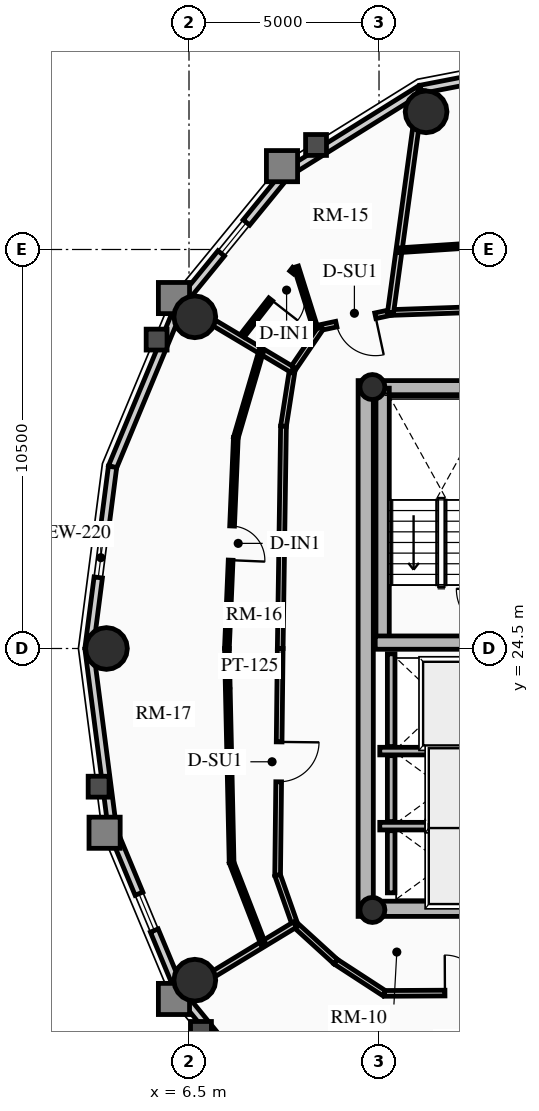
"""IFC4 building model, lengths in metres.
Left out: names, types, materials, properties, quantities, classifications, styles, units other than length and angle.
Written with IfcOpenShell. Run it as: python <this file> out.ifc"""

import sys

from ifc_helpers import new_model, si_unit, direction, frame, frame_2d, origin, origin_2d, place, context, subcontext, project, spatial, rectangle, circle, hollow_circle, extrude, source, transform, mapped, element, fill, save


model = new_model("IFC4")
c1 = context("Model", 3, precision=1e-05, world=origin(), true_north=direction((0.0, 1.0)))
c2 = subcontext(c1, "Body", "Model", "MODEL_VIEW")
j1 = project(units=[si_unit("LENGTHUNIT", "METRE"), si_unit("PLANEANGLEUNIT", "RADIAN")], contexts=[c1])
p1 = place(None, origin())
s1 = spatial("IfcSite", under=j1, at=p1, CompositionType="ELEMENT")
p2 = place(p1, origin())
s2 = spatial("IfcBuilding", under=s1, at=p2, CompositionType="ELEMENT")
p3 = place(p2, frame((0.0, 0.0, 219.94)))
s3 = spatial("IfcBuildingStorey", under=s2, at=p3, CompositionType="ELEMENT", Elevation=219.94)
p4 = place(p3, frame((11.15, 17.45, 0.0), z_axis=(0.0, 0.0, 1.0), x_axis=(0.0, 1.0, 0.0)))
e1 = element("IfcWall", 1, at=p4, inside=s3, PredefinedType="SHEAR", context=c2, shape_type="SweptSolid", body=[
    extrude(rectangle(XDim=14.1, YDim=0.4, at=frame_2d((7.05, 0.0))), origin(), (0.0, 0.0, 1.0), 2.91),
])
p5 = place(p3, frame((11.15, 17.65, 0.0), z_axis=(0.0, 0.0, 1.0), x_axis=(1.0, 0.0, 0.0)))
e2 = element("IfcWall", 2, at=p5, inside=s3, PredefinedType="SHEAR", context=c2, shape_type="SweptSolid", body=[
    extrude(rectangle(XDim=10.7, YDim=0.4, at=frame_2d((5.35, 0.0))), origin(), (0.0, 0.0, 1.0), 2.91),
])
m1 = source(origin(), c2, "Body", "SweptSolid", [
    extrude(rectangle(XDim=1.5, YDim=2.02, at=frame_2d((0.75, 1.01))), frame((0.0, 0.21, 0.0), z_axis=(0.0, -1.0, 0.0), x_axis=(1.0, 0.0, 0.0)), (0.0, 0.0, 1.0), 0.42),
])
p6 = place(p5, frame((5.45, 0.0, 0.0)))
e3 = element("IfcOpeningElement", 3, at=p6, cuts=e2, PredefinedType="OPENING", context=c2, shape_type="MappedRepresentation", body=[
    mapped(m1, transform((0.0, 0.0, 0.0), x_axis=(1.0, 0.0, 0.0), y_axis=(0.0, 1.0, 0.0), z_axis=(0.0, 0.0, 1.0), scale=1.0)),
])
p7 = place(p3, frame((11.15, 31.35, 0.0), z_axis=(0.0, 0.0, 1.0), x_axis=(1.0, 0.0, 0.0)))
e4 = element("IfcWall", 4, at=p7, inside=s3, PredefinedType="SHEAR", context=c2, shape_type="SweptSolid", body=[
    extrude(rectangle(XDim=10.7, YDim=0.4, at=frame_2d((5.35, 0.0))), origin(), (0.0, 0.0, 1.0), 2.91),
])
p8 = place(p7, frame((4.6, 0.0, 0.0)))
e5 = element("IfcOpeningElement", 5, at=p8, cuts=e4, PredefinedType="OPENING", context=c2, shape_type="MappedRepresentation", body=[
    mapped(m1, transform((0.0, 0.0, 0.0), x_axis=(1.0, 0.0, 0.0), y_axis=(0.0, 1.0, 0.0), z_axis=(0.0, 0.0, 1.0), scale=1.0)),
])
p9 = place(p3, frame((11.595, 24.655, 0.0), z_axis=(0.0, 0.0, 1.0), x_axis=(0.0, 1.0, 0.0)))
e6 = element("IfcWall", 6, at=p9, inside=s3, PredefinedType="SHEAR", context=c2, shape_type="SweptSolid", body=[
    extrude(rectangle(XDim=6.695, YDim=0.35, at=frame_2d((3.348, 0.0))), origin(), (0.0, 0.0, 1.0), 2.91),
])
p10 = place(p3, frame((11.4, 24.655, 0.0), z_axis=(0.0, 0.0, 1.0), x_axis=(1.0, 0.0, 0.0)))
e7 = element("IfcWall", 7, at=p10, inside=s3, PredefinedType="SHEAR", context=c2, shape_type="SweptSolid", body=[
    extrude(rectangle(XDim=3.285, YDim=0.35, at=frame_2d((1.643, 0.0))), origin(), (0.0, 0.0, 1.0), 2.91),
])
for number, where, z_axis, x_axis in (
    (8, (11.325, 17.62, 0.0), (0.0, 0.0, 1.0), (1.0, 0.0, 0.0)),
    (9, (11.325, 31.38, 0.0), (0.0, 0.0, 1.0), (1.0, 0.0, 0.0)),
):
    element("IfcColumn", number, at=place(p3, frame(where, z_axis=z_axis, x_axis=x_axis)), inside=s3, PredefinedType="COLUMN", context=c2, shape_type="SweptSolid", body=[
        extrude(hollow_circle(Radius=0.33, WallThickness=0.025, at=origin_2d()), origin(), (0.0, 0.0, 1.0), 2.91),
    ])
for number, where, z_axis, x_axis in (
    (10, (12.739, 38.623, 0.0), (0.0, 0.0, 1.0), (1.0, 0.0, 0.0)),
    (11, (6.653, 33.229, 0.0), (0.0, 0.0, 1.0), (1.0, 0.0, 0.0)),
    (12, (4.328, 24.5, 0.0), (0.0, 0.0, 1.0), (1.0, 0.0, 0.0)),
    (13, (6.653, 15.771, 0.0), (0.0, 0.0, 1.0), (1.0, 0.0, 0.0)),
):
    element("IfcColumn", number, at=place(p3, frame(where, z_axis=z_axis, x_axis=x_axis)), inside=s3, PredefinedType="USERDEFINED", context=c2, shape_type="SweptSolid", body=[
        extrude(circle(Radius=0.55, at=origin_2d()), origin(), (0.0, 0.0, 1.0), 2.91),
    ])
p11 = place(p3, frame((12.597, 39.213, 0.0), z_axis=(0.0, 0.0, 1.0), x_axis=(0.981700307484, 0.190432419211, 0.0)))
e14 = element("IfcWall", 14, at=p11, inside=s3, PredefinedType="SOLIDWALL", context=c2, shape_type="SweptSolid", body=[
    extrude(rectangle(XDim=3.976, YDim=0.22, at=frame_2d((1.988, 0.0))), origin(), (0.0, 0.0, 1.0), 2.322),
])
m2 = source(origin(), c2, "Body", "SweptSolid", [
    extrude(rectangle(XDim=1.05, YDim=1.3, at=frame_2d((0.525, 0.65))), frame((0.0, 0.12, 0.0), z_axis=(0.0, -1.0, 0.0), x_axis=(1.0, 0.0, 0.0)), (0.0, 0.0, 1.0), 0.24),
])
p12 = place(p11, frame((1.463, 0.0, 0.65)))
e15 = element("IfcOpeningElement", 15, at=p12, cuts=e14, PredefinedType="OPENING", context=c2, shape_type="MappedRepresentation", body=[
    mapped(m2, transform((0.0, 0.0, 0.0), x_axis=(1.0, 0.0, 0.0), y_axis=(0.0, 1.0, 0.0), z_axis=(0.0, 0.0, 1.0), scale=1.0)),
])
p13 = place(p3, frame((9.076, 37.015, 0.0), z_axis=(0.0, 0.0, 1.0), x_axis=(0.848318713376, 0.529485939886, 0.0)))
e16 = element("IfcWall", 16, at=p13, inside=s3, PredefinedType="SOLIDWALL", context=c2, shape_type="SweptSolid", body=[
    extrude(rectangle(XDim=4.15, YDim=0.22, at=frame_2d((2.075, 0.0))), origin(), (0.0, 0.0, 1.0), 2.322),
])
p14 = place(p3, frame((6.282, 33.593, 0.0), z_axis=(0.0, 0.0, 1.0), x_axis=(0.632467166636, 0.774587169483, 0.0)))
e17 = element("IfcWall", 17, at=p14, inside=s3, PredefinedType="SOLIDWALL", context=c2, shape_type="SweptSolid", body=[
    extrude(rectangle(XDim=4.418, YDim=0.22, at=frame_2d((2.209, 0.0))), origin(), (0.0, 0.0, 1.0), 2.322),
])
p15 = place(p14, frame((1.684, 0.0, 0.65)))
e18 = element("IfcOpeningElement", 18, at=p15, cuts=e17, PredefinedType="OPENING", context=c2, shape_type="MappedRepresentation", body=[
    mapped(m2, transform((0.0, 0.0, 0.0), x_axis=(1.0, 0.0, 0.0), y_axis=(0.0, 1.0, 0.0), z_axis=(0.0, 0.0, 1.0), scale=1.0)),
])
p16 = place(p3, frame((4.488, 29.281, 0.0), z_axis=(0.0, 0.0, 1.0), x_axis=(0.384036305194, 0.923317993052, 0.0)))
e19 = element("IfcWall", 19, at=p16, inside=s3, PredefinedType="SOLIDWALL", context=c2, shape_type="SweptSolid", body=[
    extrude(rectangle(XDim=4.671, YDim=0.22, at=frame_2d((2.335, 0.0))), origin(), (0.0, 0.0, 1.0), 2.322),
])
p17 = place(p3, frame((3.87, 24.5, 0.0), z_axis=(0.0, 0.0, 1.0), x_axis=(0.128241318541, 0.991742993027, 0.0)))
e20 = element("IfcWall", 20, at=p17, inside=s3, PredefinedType="SOLIDWALL", context=c2, shape_type="SweptSolid", body=[
    extrude(rectangle(XDim=4.82, YDim=0.22, at=frame_2d((2.41, 0.0))), origin(), (0.0, 0.0, 1.0), 2.322),
])
p18 = place(p17, frame((1.885, 0.0, 0.65)))
e21 = element("IfcOpeningElement", 21, at=p18, cuts=e20, PredefinedType="OPENING", context=c2, shape_type="MappedRepresentation", body=[
    mapped(m2, transform((0.0, 0.0, 0.0), x_axis=(1.0, 0.0, 0.0), y_axis=(0.0, 1.0, 0.0), z_axis=(0.0, 0.0, 1.0), scale=1.0)),
])
p19 = place(p3, frame((4.488, 19.719, 0.0), z_axis=(0.0, 0.0, 1.0), x_axis=(-0.128241318541, 0.991742993027, 0.0)))
e22 = element("IfcWall", 22, at=p19, inside=s3, PredefinedType="SOLIDWALL", context=c2, shape_type="SweptSolid", body=[
    extrude(rectangle(XDim=4.82, YDim=0.22, at=frame_2d((2.41, 0.0))), origin(), (0.0, 0.0, 1.0), 2.322),
])
p20 = place(p3, frame((6.282, 15.407, 0.0), z_axis=(0.0, 0.0, 1.0), x_axis=(-0.384036305194, 0.923317993052, 0.0)))
e23 = element("IfcWall", 23, at=p20, inside=s3, PredefinedType="SOLIDWALL", context=c2, shape_type="SweptSolid", body=[
    extrude(rectangle(XDim=4.671, YDim=0.22, at=frame_2d((2.335, 0.0))), origin(), (0.0, 0.0, 1.0), 2.322),
])
p21 = place(p20, frame((1.81, 0.0, 0.65)))
e24 = element("IfcOpeningElement", 24, at=p21, cuts=e23, PredefinedType="OPENING", context=c2, shape_type="MappedRepresentation", body=[
    mapped(m2, transform((0.0, 0.0, 0.0), x_axis=(1.0, 0.0, 0.0), y_axis=(0.0, 1.0, 0.0), z_axis=(0.0, 0.0, 1.0), scale=1.0)),
])
p22 = place(p3, frame((9.076, 11.985, 0.0), z_axis=(0.0, 0.0, 1.0), x_axis=(-0.632467166636, 0.774587169483, 0.0)))
e25 = element("IfcWall", 25, at=p22, inside=s3, PredefinedType="SOLIDWALL", context=c2, shape_type="SweptSolid", body=[
    extrude(rectangle(XDim=4.418, YDim=0.22, at=frame_2d((2.209, 0.0))), origin(), (0.0, 0.0, 1.0), 2.322),
])
p23 = place(p3, frame((11.52, 21.8, 0.0), z_axis=(0.0, 0.0, 1.0), x_axis=(1.0, 0.0, 0.0)))
e26 = element("IfcWall", 26, at=p23, inside=s3, PredefinedType="SHEAR", context=c2, shape_type="SweptSolid", body=[
    extrude(rectangle(XDim=2.97, YDim=0.2, at=frame_2d((1.485, 0.0))), origin(), (0.0, 0.0, 1.0), 2.91),
])
p24 = place(p3, frame((11.82, 21.92, 0.0), z_axis=(0.0, 0.0, 1.0), x_axis=(0.0, 1.0, 0.0)))
e27 = element("IfcWall", 27, at=p24, inside=s3, PredefinedType="SHEAR", context=c2, shape_type="SweptSolid", body=[
    extrude(rectangle(XDim=2.44, YDim=0.2, at=frame_2d((1.22, 0.0))), origin(), (0.0, 0.0, 1.0), 2.91),
])
p25 = place(p3, frame((11.52, 19.825, 0.0), z_axis=(0.0, 0.0, 1.0), x_axis=(1.0, 0.0, 0.0)))
e28 = element("IfcWall", 28, at=p25, inside=s3, PredefinedType="SHEAR", context=c2, shape_type="SweptSolid", body=[
    extrude(rectangle(XDim=2.97, YDim=0.2, at=frame_2d((1.485, 0.0))), origin(), (0.0, 0.0, 1.0), 2.91),
])
p26 = place(p3, frame((11.82, 19.945, 0.0), z_axis=(0.0, 0.0, 1.0), x_axis=(0.0, 1.0, 0.0)))
e29 = element("IfcWall", 29, at=p26, inside=s3, PredefinedType="SHEAR", context=c2, shape_type="SweptSolid", body=[
    extrude(rectangle(XDim=1.735, YDim=0.2, at=frame_2d((0.867, 0.0))), origin(), (0.0, 0.0, 1.0), 2.91),
])
p27 = place(p3, frame((11.82, 18.07, 0.0), z_axis=(0.0, 0.0, 1.0), x_axis=(0.0, 1.0, 0.0)))
e30 = element("IfcWall", 30, at=p27, inside=s3, PredefinedType="SHEAR", context=c2, shape_type="SweptSolid", body=[
    extrude(rectangle(XDim=1.635, YDim=0.2, at=frame_2d((0.817, 0.0))), origin(), (0.0, 0.0, 1.0), 2.91),
])
p28 = place(p3, frame((18.082, 33.56, 0.0), z_axis=(0.0, 0.0, 1.0), x_axis=(-0.999399009709, -0.034664382185, 0.0)))
e31 = element("IfcWall", 31, at=p28, inside=s3, PredefinedType="PARTITIONING", context=c2, shape_type="SweptSolid", body=[
    extrude(rectangle(XDim=6.282, YDim=0.15, at=frame_2d((3.141, 0.0))), origin(), (0.0, 0.0, 1.0), 2.255),
])
p29 = place(p3, frame((11.803, 33.342, 0.0), z_axis=(0.0, 0.0, 1.0), x_axis=(-0.977750742783, -0.209770076483, 0.0)))
e32 = element("IfcWall", 32, at=p29, inside=s3, PredefinedType="PARTITIONING", context=c2, shape_type="SweptSolid", body=[
    extrude(rectangle(XDim=1.868, YDim=0.15, at=frame_2d((0.934, 0.0))), origin(), (0.0, 0.0, 1.0), 2.255),
])
m3 = source(origin(), c2, "Body", "SweptSolid", [
    extrude(rectangle(XDim=1.05, YDim=2.015, at=frame_2d((0.525, 1.007))), frame((0.0, 0.085, 0.0), z_axis=(0.0, -1.0, 0.0), x_axis=(1.0, 0.0, 0.0)), (0.0, 0.0, 1.0), 0.17),
])
p30 = place(p29, frame((0.409, 0.0, 0.0)))
e33 = element("IfcOpeningElement", 33, at=p30, cuts=e32, PredefinedType="OPENING", context=c2, shape_type="MappedRepresentation", body=[
    mapped(m3, transform((0.0, 0.0, 0.0), x_axis=(1.0, 0.0, 0.0), y_axis=(0.0, 1.0, 0.0), z_axis=(0.0, 0.0, 1.0), scale=1.0)),
])
p31 = place(p3, frame((9.977, 32.95, 0.0), z_axis=(0.0, 0.0, 1.0), x_axis=(-0.563291804539, -0.826258036535, 0.0)))
e34 = element("IfcWall", 34, at=p31, inside=s3, PredefinedType="PARTITIONING", context=c2, shape_type="SweptSolid", body=[
    extrude(rectangle(XDim=1.346, YDim=0.15, at=frame_2d((0.673, 0.0))), origin(), (0.0, 0.0, 1.0), 2.322),
])
p32 = place(p3, frame((9.219, 31.838, 0.0), z_axis=(0.0, 0.0, 1.0), x_axis=(-0.154065528966, -0.98806063214, 0.0)))
e35 = element("IfcWall", 35, at=p32, inside=s3, PredefinedType="PARTITIONING", context=c2, shape_type="SweptSolid", body=[
    extrude(rectangle(XDim=1.507, YDim=0.15, at=frame_2d((0.753, 0.0))), origin(), (0.0, 0.0, 1.0), 2.255),
])
p33 = place(p3, frame((8.986, 30.349, 0.0), z_axis=(0.0, 0.0, 1.0), x_axis=(-0.014775478218, -0.999890836663, 0.0)))
e36 = element("IfcWall", 36, at=p33, inside=s3, PredefinedType="PARTITIONING", context=c2, shape_type="SweptSolid", body=[
    extrude(rectangle(XDim=5.849, YDim=0.15, at=frame_2d((2.925, 0.0))), origin(), (0.0, 0.0, 1.0), 2.685),
])
p34 = place(p3, frame((8.9, 24.5, 0.0), z_axis=(0.0, 0.0, 1.0), x_axis=(-0.011416369353, -0.999934831132, 0.0)))
e37 = element("IfcWall", 37, at=p34, inside=s3, PredefinedType="PARTITIONING", context=c2, shape_type="SweptSolid", body=[
    extrude(rectangle(XDim=5.967, YDim=0.15, at=frame_2d((2.983, 0.0))), origin(), (0.0, 0.0, 1.0), 2.322),
])
p35 = place(p34, frame((2.458, 0.0, 0.0)))
e38 = element("IfcOpeningElement", 38, at=p35, cuts=e37, PredefinedType="OPENING", context=c2, shape_type="MappedRepresentation", body=[
    mapped(m3, transform((0.0, 0.0, 0.0), x_axis=(1.0, 0.0, 0.0), y_axis=(0.0, 1.0, 0.0), z_axis=(0.0, 0.0, 1.0), scale=1.0)),
])
p36 = place(p3, frame((8.832, 18.534, 0.0), z_axis=(0.0, 0.0, 1.0), x_axis=(0.332031819657, -0.943268186008, 0.0)))
e39 = element("IfcWall", 39, at=p36, inside=s3, PredefinedType="PARTITIONING", context=c2, shape_type="SweptSolid", body=[
    extrude(rectangle(XDim=1.377, YDim=0.15, at=frame_2d((0.688, 0.0))), origin(), (0.0, 0.0, 1.0), 2.255),
])
p37 = place(p3, frame((9.289, 17.235, 0.0), z_axis=(0.0, 0.0, 1.0), x_axis=(0.739015164946, -0.673688790155, 0.0)))
e40 = element("IfcWall", 40, at=p37, inside=s3, PredefinedType="PARTITIONING", context=c2, shape_type="SweptSolid", body=[
    extrude(rectangle(XDim=1.446, YDim=0.15, at=frame_2d((0.723, 0.0))), origin(), (0.0, 0.0, 1.0), 2.322),
])
p38 = place(p3, frame((10.358, 16.26, 0.0), z_axis=(0.0, 0.0, 1.0), x_axis=(0.838265397059, -0.545262435983, 0.0)))
e41 = element("IfcWall", 41, at=p38, inside=s3, PredefinedType="PARTITIONING", context=c2, shape_type="SweptSolid", body=[
    extrude(rectangle(XDim=1.534, YDim=0.15, at=frame_2d((0.767, 0.0))), origin(), (0.0, 0.0, 1.0), 2.255),
])
p39 = place(p3, frame((11.644, 15.424, 0.0), z_axis=(0.0, 0.0, 1.0), x_axis=(0.999986552511, 0.005186019339, 0.0)))
e42 = element("IfcWall", 42, at=p39, inside=s3, PredefinedType="PARTITIONING", context=c2, shape_type="SweptSolid", body=[
    extrude(rectangle(XDim=3.201, YDim=0.15, at=frame_2d((1.601, 0.0))), origin(), (0.0, 0.0, 1.0), 2.322),
])
m4 = source(origin(), c2, "Body", "SweptSolid", [
    extrude(rectangle(XDim=1.0, YDim=2.015, at=frame_2d((0.5, 1.007))), frame((0.0, 0.085, 0.0), z_axis=(0.0, -1.0, 0.0), x_axis=(1.0, 0.0, 0.0)), (0.0, 0.0, 1.0), 0.17),
])
p40 = place(p39, frame((1.591, 0.0, 0.0)))
e43 = element("IfcOpeningElement", 43, at=p40, cuts=e42, PredefinedType="OPENING", context=c2, shape_type="MappedRepresentation", body=[
    mapped(m4, transform((0.0, 0.0, 0.0), x_axis=(1.0, 0.0, 0.0), y_axis=(0.0, 1.0, 0.0), z_axis=(0.0, 0.0, 1.0), scale=1.0)),
])
p41 = place(p3, frame((11.803, 33.342, 0.0), z_axis=(0.0, 0.0, 1.0), x_axis=(0.135452591041, 0.990783828885, 0.0)))
e44 = element("IfcWall", 44, at=p41, inside=s3, PredefinedType="PARTITIONING", context=c2, shape_type="SweptSolid", body=[
    extrude(rectangle(XDim=5.906, YDim=0.16, at=frame_2d((2.953, 0.0))), origin(), (0.0, 0.0, 1.0), 2.322),
])
p42 = place(p3, frame((9.219, 31.838, 0.0), z_axis=(0.0, 0.0, 1.0), x_axis=(-0.858586714977, 0.512668365384, 0.0)))
e45 = element("IfcWall", 45, at=p42, inside=s3, PredefinedType="PARTITIONING", context=c2, shape_type="SweptSolid", body=[
    extrude(rectangle(XDim=3.401, YDim=0.16, at=frame_2d((1.701, 0.0))), origin(), (0.0, 0.0, 1.0), 2.322),
])
p43 = place(p3, frame((9.289, 17.235, 0.0), z_axis=(0.0, 0.0, 1.0), x_axis=(-0.854741081983, -0.519054604806, 0.0)))
e46 = element("IfcWall", 46, at=p43, inside=s3, PredefinedType="PARTITIONING", context=c2, shape_type="SweptSolid", body=[
    extrude(rectangle(XDim=3.499, YDim=0.16, at=frame_2d((1.75, 0.0))), origin(), (0.0, 0.0, 1.0), 2.322),
])
p44 = place(p3, frame((17.639, 35.349, 0.0), z_axis=(0.0, 0.0, 1.0), x_axis=(-0.997849042159, -0.065553711275, 0.0)))
e47 = element("IfcWall", 47, at=p44, inside=s3, PredefinedType="PARTITIONING", context=c2, shape_type="SweptSolid", body=[
    extrude(rectangle(XDim=5.624, YDim=0.125, at=frame_2d((2.812, 0.0))), origin(), (0.0, 0.0, 1.0), 2.255),
])
m5 = source(origin(), c2, "Body", "SweptSolid", [
    extrude(rectangle(XDim=0.9, YDim=2.005, at=frame_2d((0.45, 1.002))), frame((0.0, 0.073, 0.0), z_axis=(0.0, -1.0, 0.0), x_axis=(1.0, 0.0, 0.0)), (0.0, 0.0, 1.0), 0.145),
])
p45 = place(p44, frame((2.362, 0.0, 0.0)))
e48 = element("IfcOpeningElement", 48, at=p45, cuts=e47, PredefinedType="OPENING", context=c2, shape_type="MappedRepresentation", body=[
    mapped(m5, transform((0.0, 0.0, 0.0), x_axis=(1.0, 0.0, 0.0), y_axis=(0.0, 1.0, 0.0), z_axis=(0.0, 0.0, 1.0), scale=1.0)),
])
p46 = place(p3, frame((9.835, 32.906, 0.0), z_axis=(0.0, 0.0, 1.0), x_axis=(-0.300376803481, 0.953820620416, 0.0)))
e49 = element("IfcWall", 49, at=p46, inside=s3, PredefinedType="PARTITIONING", context=c2, shape_type="SweptSolid", body=[
    extrude(rectangle(XDim=1.719, YDim=0.125, at=frame_2d((0.859, 0.0))), origin(), (0.0, 0.0, 1.0), 2.685),
])
p47 = place(p3, frame((9.276, 34.491, 0.0), z_axis=(0.0, 0.0, 1.0), x_axis=(-0.615039973806, -0.788495929362, 0.0)))
e50 = element("IfcWall", 50, at=p47, inside=s3, PredefinedType="PARTITIONING", context=c2, shape_type="SweptSolid", body=[
    extrude(rectangle(XDim=2.228, YDim=0.125, at=frame_2d((1.114, 0.0))), origin(), (0.0, 0.0, 1.0), 2.322),
])
p48 = place(p47, frame((0.12, 0.0, 0.0)))
e51 = element("IfcOpeningElement", 51, at=p48, cuts=e50, PredefinedType="OPENING", context=c2, shape_type="MappedRepresentation", body=[
    mapped(m5, transform((0.0, 0.0, 0.0), x_axis=(1.0, 0.0, 0.0), y_axis=(0.0, 1.0, 0.0), z_axis=(0.0, 0.0, 1.0), scale=1.0)),
])
p49 = place(p3, frame((8.401, 32.326, 0.0), z_axis=(0.0, 0.0, 1.0), x_axis=(-0.281681886596, -0.959507850288, 0.0)))
e52 = element("IfcWall", 52, at=p49, inside=s3, PredefinedType="PARTITIONING", context=c2, shape_type="SweptSolid", body=[
    extrude(rectangle(XDim=2.374, YDim=0.125, at=frame_2d((1.187, 0.0))), origin(), (0.0, 0.0, 1.0), 2.255),
])
p50 = place(p3, frame((7.732, 30.048, 0.0), z_axis=(0.0, 0.0, 1.0), x_axis=(-0.042296211955, -0.999105114817, 0.0)))
e53 = element("IfcWall", 53, at=p50, inside=s3, PredefinedType="PARTITIONING", context=c2, shape_type="SweptSolid", body=[
    extrude(rectangle(XDim=5.553, YDim=0.125, at=frame_2d((2.776, 0.0))), origin(), (0.0, 0.0, 1.0), 2.685),
])
p51 = place(p50, frame((2.326, 0.0, 0.0)))
e54 = element("IfcOpeningElement", 54, at=p51, cuts=e53, PredefinedType="OPENING", context=c2, shape_type="MappedRepresentation", body=[
    mapped(m5, transform((0.0, 0.0, 0.0), x_axis=(1.0, 0.0, 0.0), y_axis=(0.0, 1.0, 0.0), z_axis=(0.0, 0.0, 1.0), scale=1.0)),
])
p52 = place(p3, frame((7.497, 24.5, 0.0), z_axis=(0.0, 0.0, 1.0), x_axis=(0.021927972859, -0.999759553096, 0.0)))
e55 = element("IfcWall", 55, at=p52, inside=s3, PredefinedType="PARTITIONING", context=c2, shape_type="SweptSolid", body=[
    extrude(rectangle(XDim=5.634, YDim=0.125, at=frame_2d((2.817, 0.0))), origin(), (0.0, 0.0, 1.0), 2.322),
])
p53 = place(p3, frame((7.621, 18.868, 0.0), z_axis=(0.0, 0.0, 1.0), x_axis=(0.361712646649, -0.93228963378, 0.0)))
e56 = element("IfcWall", 56, at=p53, inside=s3, PredefinedType="PARTITIONING", context=c2, shape_type="SweptSolid", body=[
    extrude(rectangle(XDim=2.297, YDim=0.125, at=frame_2d((1.148, 0.0))), origin(), (0.0, 0.0, 1.0), 2.255),
])
m6 = source(origin(), c2, "Body", "SweptSolid", [
    extrude(rectangle(XDim=1.05, YDim=1.3, at=frame_2d((0.525, 0.65))), frame((0.0, 0.03, 0.0), z_axis=(0.0, -1.0, 0.0), x_axis=(1.0, 0.0, 0.0)), (0.0, 0.0, 1.0), 0.06),
])
p54 = place(p15, origin())
e57 = element("IfcWindow", 57, at=p54, inside=s3, PartitioningType="SINGLE_PANEL", PredefinedType="WINDOW", context=c2, shape_type="MappedRepresentation", body=[
    mapped(m6, transform((0.0, 0.0, 0.0), x_axis=(1.0, 0.0, 0.0), y_axis=(0.0, 1.0, 0.0), z_axis=(0.0, 0.0, 1.0), scale=1.0)),
])
fill(e18, e57)
p55 = place(p18, origin())
e58 = element("IfcWindow", 58, at=p55, inside=s3, PartitioningType="SINGLE_PANEL", PredefinedType="WINDOW", context=c2, shape_type="MappedRepresentation", body=[
    mapped(m6, transform((0.0, 0.0, 0.0), x_axis=(1.0, 0.0, 0.0), y_axis=(0.0, 1.0, 0.0), z_axis=(0.0, 0.0, 1.0), scale=1.0)),
])
fill(e21, e58)
p56 = place(p21, origin())
e59 = element("IfcWindow", 59, at=p56, inside=s3, PartitioningType="SINGLE_PANEL", PredefinedType="WINDOW", context=c2, shape_type="MappedRepresentation", body=[
    mapped(m6, transform((0.0, 0.0, 0.0), x_axis=(1.0, 0.0, 0.0), y_axis=(0.0, 1.0, 0.0), z_axis=(0.0, 0.0, 1.0), scale=1.0)),
])
fill(e24, e59)
m7 = source(origin(), c2, "Body", "SweptSolid", [
    extrude(rectangle(XDim=1.05, YDim=2.015, at=frame_2d((0.525, 1.007))), frame((0.0, 0.025, 0.0), z_axis=(0.0, -1.0, 0.0), x_axis=(1.0, 0.0, 0.0)), (0.0, 0.0, 1.0), 0.05),
])
p57 = place(p30, origin())
e60 = element("IfcDoor", 60, at=p57, inside=s3, OperationType="SINGLE_SWING_LEFT", PredefinedType="DOOR", context=c2, shape_type="MappedRepresentation", body=[
    mapped(m7, transform((0.0, 0.0, 0.0), x_axis=(1.0, 0.0, 0.0), y_axis=(0.0, 1.0, 0.0), z_axis=(0.0, 0.0, 1.0), scale=1.0)),
])
fill(e33, e60)
m8 = source(origin(), c2, "Body", "SweptSolid", [
    extrude(rectangle(XDim=0.9, YDim=2.005, at=frame_2d((0.45, 1.002))), frame((0.0, 0.025, 0.0), z_axis=(0.0, -1.0, 0.0), x_axis=(1.0, 0.0, 0.0)), (0.0, 0.0, 1.0), 0.05),
])
p58 = place(p48, origin())
e61 = element("IfcDoor", 61, at=p58, inside=s3, OperationType="SINGLE_SWING_RIGHT", PredefinedType="DOOR", context=c2, shape_type="MappedRepresentation", body=[
    mapped(m8, transform((0.0, 0.0, 0.0), x_axis=(1.0, 0.0, 0.0), y_axis=(0.0, 1.0, 0.0), z_axis=(0.0, 0.0, 1.0), scale=1.0)),
])
fill(e51, e61)
p59 = place(p35, origin())
e62 = element("IfcDoor", 62, at=p59, inside=s3, OperationType="SINGLE_SWING_LEFT", PredefinedType="DOOR", context=c2, shape_type="MappedRepresentation", body=[
    mapped(m7, transform((0.0, 0.0, 0.0), x_axis=(1.0, 0.0, 0.0), y_axis=(0.0, 1.0, 0.0), z_axis=(0.0, 0.0, 1.0), scale=1.0)),
])
fill(e38, e62)
p60 = place(p51, origin())
e63 = element("IfcDoor", 63, at=p60, inside=s3, OperationType="SINGLE_SWING_RIGHT", PredefinedType="DOOR", context=c2, shape_type="MappedRepresentation", body=[
    mapped(m8, transform((0.0, 0.0, 0.0), x_axis=(1.0, 0.0, 0.0), y_axis=(0.0, 1.0, 0.0), z_axis=(0.0, 0.0, 1.0), scale=1.0)),
])
fill(e54, e63)
m9 = source(origin(), c2, "Body", "SweptSolid", [
    extrude(rectangle(XDim=1.0, YDim=2.015, at=frame_2d((0.5, 1.007))), frame((0.0, 0.025, 0.0), z_axis=(0.0, -1.0, 0.0), x_axis=(1.0, 0.0, 0.0)), (0.0, 0.0, 1.0), 0.05),
])
p61 = place(p40, origin())
e64 = element("IfcDoor", 64, at=p61, inside=s3, OperationType="SINGLE_SWING_LEFT", PredefinedType="DOOR", context=c2, shape_type="MappedRepresentation", body=[
    mapped(m9, transform((0.0, 0.0, 0.0), x_axis=(1.0, 0.0, 0.0), y_axis=(0.0, 1.0, 0.0), z_axis=(0.0, 0.0, 1.0), scale=1.0)),
])
fill(e43, e64)
save(model, sys.argv[1])
